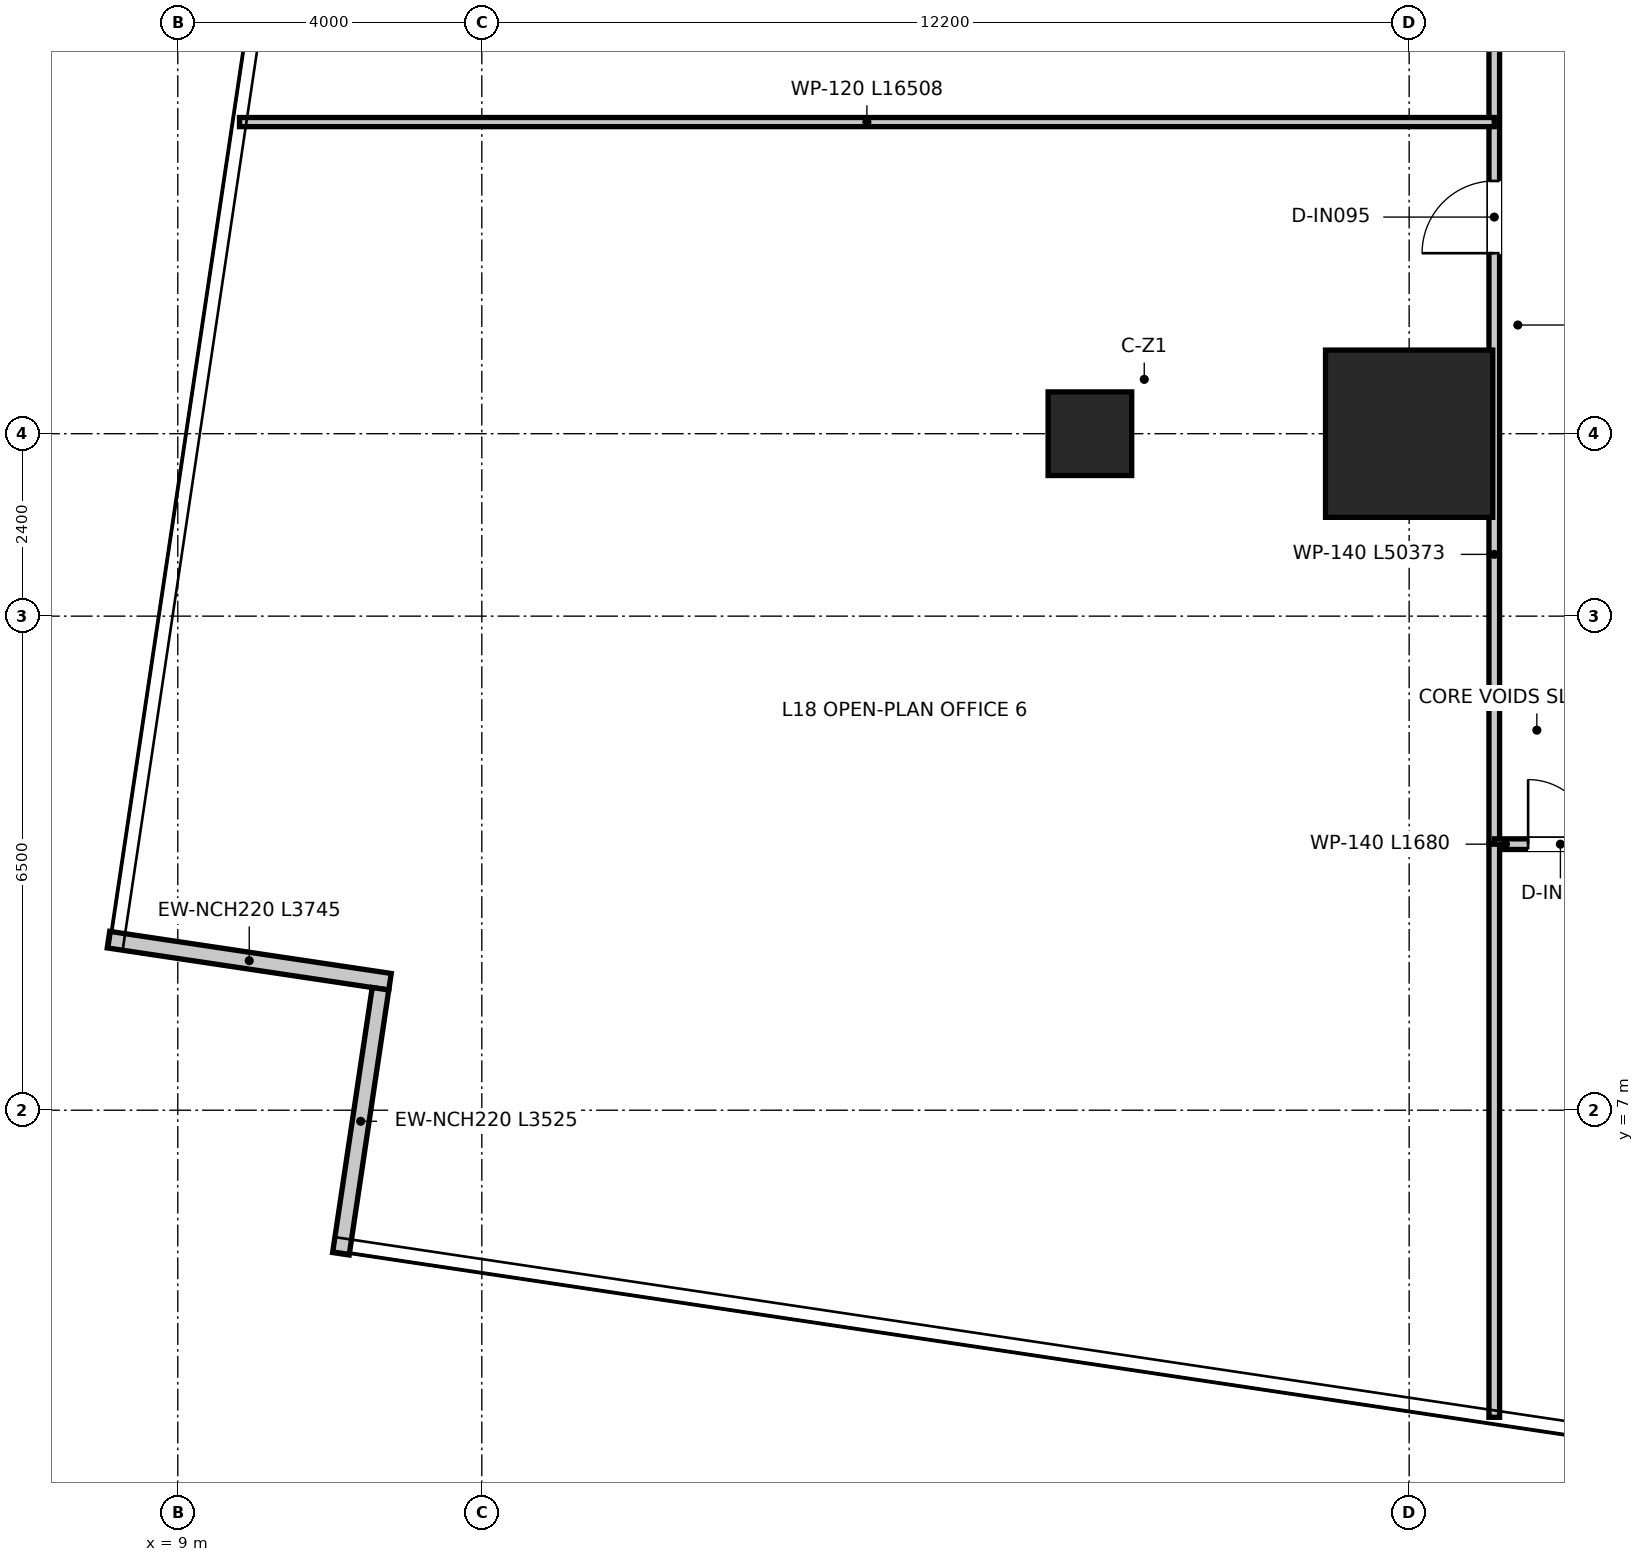
"""IFC4 building model, lengths in metres.
Left out: names, types, materials, properties, quantities, classifications, styles, units other than length and angle.
Written with IfcOpenShell. Run it as: python <this file> out.ifc"""

import sys

from ifc_helpers import new_model, si_unit, direction, frame, frame_2d, origin, origin_2d, place, context, subcontext, project, spatial, rectangle, extrude, source, transform, mapped, element, fill, save


model = new_model("IFC4")
c1 = context("Model", 3, precision=1e-05, world=origin(), true_north=direction((0.0, 1.0)))
c2 = subcontext(c1, "Body", "Model", "MODEL_VIEW")
j1 = project(units=[si_unit("LENGTHUNIT", "METRE"), si_unit("PLANEANGLEUNIT", "RADIAN")], contexts=[c1])
p1 = place(None, origin())
s1 = spatial("IfcSite", under=j1, at=p1, CompositionType="ELEMENT")
p2 = place(p1, origin())
s2 = spatial("IfcBuilding", under=s1, at=p2, CompositionType="ELEMENT")
p3 = place(p2, frame((0.0, 0.0, 76.35)))
s3 = spatial("IfcBuildingStorey", under=s2, at=p3, CompositionType="ELEMENT", Elevation=76.35)
m1 = source(origin(), c2, "Body", "SweptSolid", [
    extrude(rectangle(XDim=2.2, YDim=2.2, at=origin_2d()), origin(), (0.0, 0.0, 1.0), 3.95),
])
p4 = place(p3, frame((25.2, 15.9, 0.0), z_axis=(0.0, 0.0, 1.0), x_axis=(1.0, 0.0, 0.0)))
e1 = element("IfcColumn", 1, at=p4, inside=s3, PredefinedType="USERDEFINED", context=c2, shape_type="MappedRepresentation", body=[
    mapped(m1, transform((0.0, 0.0, 0.0), x_axis=(1.0, 0.0, 0.0), y_axis=(0.0, 1.0, 0.0), z_axis=(0.0, 0.0, 1.0), scale=1.0)),
])
m2 = source(origin(), c2, "Body", "SweptSolid", [
    extrude(rectangle(XDim=1.1, YDim=1.1, at=origin_2d()), origin(), (0.0, 0.0, 1.0), 3.95),
])
p5 = place(p3, frame((21.0, 15.9, 0.0), z_axis=(0.0, 0.0, 1.0), x_axis=(1.0, 0.0, 0.0)))
e2 = element("IfcColumn", 2, at=p5, inside=s3, PredefinedType="COLUMN", context=c2, shape_type="MappedRepresentation", body=[
    mapped(m2, transform((0.0, 0.0, 0.0), x_axis=(1.0, 0.0, 0.0), y_axis=(0.0, 1.0, 0.0), z_axis=(0.0, 0.0, 1.0), scale=1.0)),
])
p6 = place(p3, frame((8.088, 9.244, 0.0), z_axis=(0.0, 0.0, 1.0), x_axis=(0.989018923648, -0.147788932826, 0.0)))
e3 = element("IfcWall", 3, at=p6, inside=s3, PredefinedType="ELEMENTEDWALL", context=c2, shape_type="SweptSolid", body=[
    extrude(rectangle(XDim=3.745, YDim=0.22, at=frame_2d((1.873, 0.0))), origin(), (0.0, 0.0, 1.0), 3.59),
])
p7 = place(p3, frame((11.667, 8.598, 0.0), z_axis=(0.0, 0.0, 1.0), x_axis=(-0.147798551521, -0.98901748628, 0.0)))
e4 = element("IfcWall", 4, at=p7, inside=s3, PredefinedType="ELEMENTEDWALL", context=c2, shape_type="SweptSolid", body=[
    extrude(rectangle(XDim=3.525, YDim=0.22, at=frame_2d((1.763, 0.0))), origin(), (0.0, 0.0, 1.0), 3.59),
])
p8 = place(p3, frame((26.32, 10.5, 0.0), z_axis=(0.0, 0.0, 1.0), x_axis=(0.0, 1.0, 0.0)))
e5 = element("IfcWall", 5, at=p8, inside=s3, PredefinedType="PARTITIONING", context=c2, shape_type="SweptSolid", body=[
    extrude(rectangle(XDim=25.62, YDim=0.14, at=frame_2d((12.81, 0.0))), origin(), (0.0, 0.0, 1.0), 2.89),
])
p9 = place(p8, frame((7.775, 0.0, 0.0)))
e6 = element("IfcOpeningElement", 6, at=p9, cuts=e5, PredefinedType="OPENING", context=c2, shape_type="SweptSolid", body=[
    extrude(rectangle(XDim=0.95, YDim=2.1, at=frame_2d((0.475, 1.05))), frame((0.0, 0.08, 0.0), z_axis=(0.0, -1.0, 0.0), x_axis=(1.0, 0.0, 0.0)), (0.0, 0.0, 1.0), 0.16),
])
p10 = place(p8, frame((11.275, 0.0, 0.0)))
e7 = element("IfcOpeningElement", 7, at=p10, cuts=e5, PredefinedType="OPENING", context=c2, shape_type="SweptSolid", body=[
    extrude(rectangle(XDim=0.95, YDim=2.1, at=frame_2d((0.475, 1.05))), frame((0.0, 0.08, 0.0), z_axis=(0.0, -1.0, 0.0), x_axis=(1.0, 0.0, 0.0)), (0.0, 0.0, 1.0), 0.16),
])
p11 = place(p8, frame((15.775, 0.0, 0.0)))
e8 = element("IfcOpeningElement", 8, at=p11, cuts=e5, PredefinedType="OPENING", context=c2, shape_type="SweptSolid", body=[
    extrude(rectangle(XDim=0.95, YDim=2.1, at=frame_2d((0.475, 1.05))), frame((0.0, 0.08, 0.0), z_axis=(0.0, -1.0, 0.0), x_axis=(1.0, 0.0, 0.0)), (0.0, 0.0, 1.0), 0.16),
])
p12 = place(p8, frame((20.125, 0.0, 0.0)))
e9 = element("IfcOpeningElement", 9, at=p12, cuts=e5, PredefinedType="OPENING", context=c2, shape_type="SweptSolid", body=[
    extrude(rectangle(XDim=0.95, YDim=2.1, at=frame_2d((0.475, 1.05))), frame((0.0, 0.08, 0.0), z_axis=(0.0, -1.0, 0.0), x_axis=(1.0, 0.0, 0.0)), (0.0, 0.0, 1.0), 0.16),
])
p13 = place(p8, frame((22.975, 0.0, 0.0)))
e10 = element("IfcOpeningElement", 10, at=p13, cuts=e5, PredefinedType="OPENING", context=c2, shape_type="SweptSolid", body=[
    extrude(rectangle(XDim=0.95, YDim=2.1, at=frame_2d((0.475, 1.05))), frame((0.0, 0.08, 0.0), z_axis=(0.0, -1.0, 0.0), x_axis=(1.0, 0.0, 0.0)), (0.0, 0.0, 1.0), 0.16),
])
p14 = place(p3, frame((26.32, 10.5, 0.0), z_axis=(0.0, 0.0, 1.0), x_axis=(1.0, 0.0, 0.0)))
e11 = element("IfcWall", 11, at=p14, inside=s3, PredefinedType="PARTITIONING", context=c2, shape_type="SweptSolid", body=[
    extrude(rectangle(XDim=1.68, YDim=0.14, at=frame_2d((0.84, 0.0))), origin(), (0.0, 0.0, 1.0), 3.59),
])
p15 = place(p14, frame((0.445, 0.0, 0.0)))
e12 = element("IfcOpeningElement", 12, at=p15, cuts=e11, PredefinedType="OPENING", context=c2, shape_type="SweptSolid", body=[
    extrude(rectangle(XDim=0.85, YDim=2.1, at=frame_2d((0.425, 1.05))), frame((0.0, 0.08, 0.0), z_axis=(0.0, -1.0, 0.0), x_axis=(1.0, 0.0, 0.0)), (0.0, 0.0, 1.0), 0.16),
])
p16 = place(p3, frame((26.32, 2.96, 0.0), z_axis=(0.0, 0.0, 1.0), x_axis=(0.0, 1.0, 0.0)))
e13 = element("IfcWall", 13, at=p16, inside=s3, PredefinedType="PARTITIONING", context=c2, shape_type="SweptSolid", body=[
    extrude(rectangle(XDim=7.54, YDim=0.14, at=frame_2d((3.77, 0.0))), origin(), (0.0, 0.0, 1.0), 3.59),
])
p17 = place(p3, frame((9.812, 20.0, 0.0), z_axis=(0.0, 0.0, 1.0), x_axis=(1.0, 0.0, 0.0)))
e14 = element("IfcWall", 14, at=p17, inside=s3, PredefinedType="PARTITIONING", context=c2, shape_type="SweptSolid", body=[
    extrude(rectangle(XDim=16.508, YDim=0.12, at=frame_2d((8.254, 0.0))), origin(), (0.0, 0.0, 1.0), 2.89),
])
p18 = place(p9, origin())
e15 = element("IfcDoor", 15, at=p18, inside=s3, OperationType="SINGLE_SWING_LEFT", PredefinedType="DOOR", context=c2, shape_type="SweptSolid", body=[
    extrude(rectangle(XDim=0.95, YDim=2.1, at=frame_2d((0.475, 1.05))), frame((0.0, 0.025, 0.0), z_axis=(0.0, -1.0, 0.0), x_axis=(1.0, 0.0, 0.0)), (0.0, 0.0, 1.0), 0.05),
])
fill(e6, e15)
p19 = place(p15, origin())
e16 = element("IfcDoor", 16, at=p19, inside=s3, OperationType="SINGLE_SWING_LEFT", PredefinedType="DOOR", context=c2, shape_type="SweptSolid", body=[
    extrude(rectangle(XDim=0.85, YDim=2.1, at=frame_2d((0.425, 1.05))), frame((0.0, 0.025, 0.0), z_axis=(0.0, -1.0, 0.0), x_axis=(1.0, 0.0, 0.0)), (0.0, 0.0, 1.0), 0.05),
])
fill(e12, e16)
save(model, sys.argv[1])
